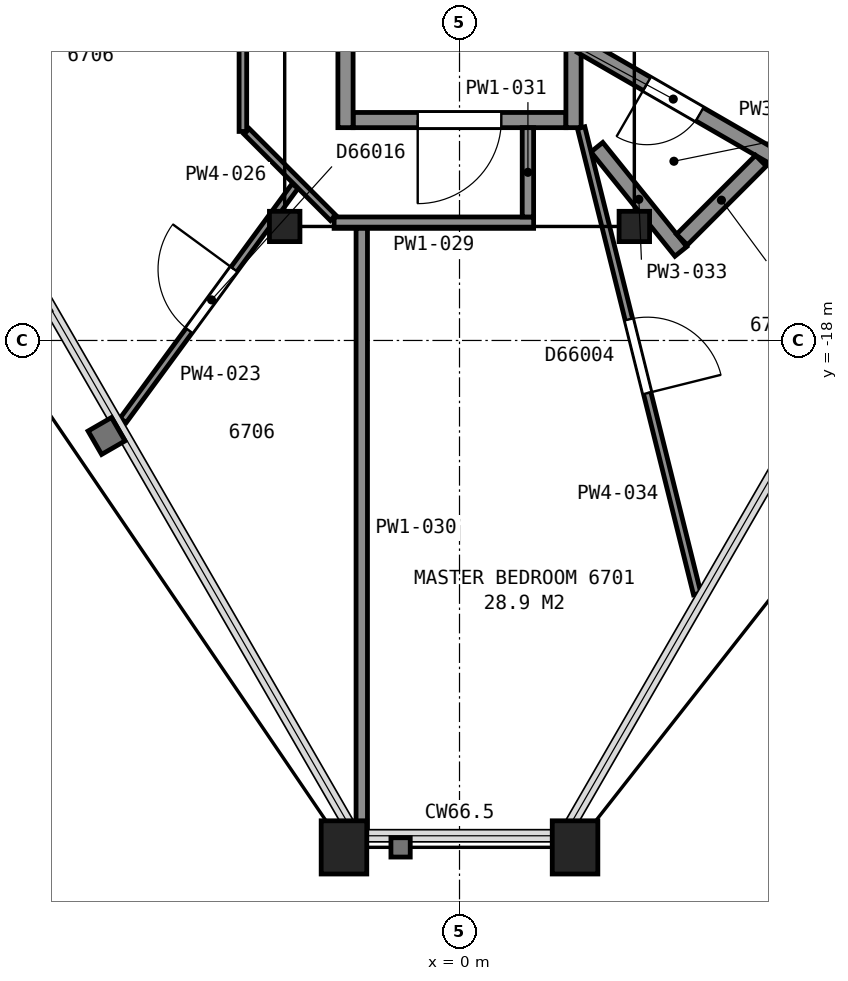
"""IFC4 building model, lengths in metres.
Left out: names, types, materials, properties, quantities, classifications, styles, units other than length and angle.
Written with IfcOpenShell. Run it as: python <this file> out.ifc"""

import sys

from ifc_helpers import new_model, si_unit, direction, frame, frame_2d, origin, origin_2d, place, context, subcontext, project, spatial, rectangle, hollow_rectangle, i_section, extrude, element, fill, save


model = new_model("IFC4")
c1 = context("Model", 3, precision=1e-05, world=origin(), true_north=direction((0.0, 1.0)))
c2 = subcontext(c1, "Body", "Model", "MODEL_VIEW")
j1 = project(units=[si_unit("LENGTHUNIT", "METRE"), si_unit("PLANEANGLEUNIT", "RADIAN")], contexts=[c1])
p1 = place(None, origin())
s1 = spatial("IfcSite", under=j1, at=p1, CompositionType="ELEMENT")
p2 = place(p1, origin())
s2 = spatial("IfcBuilding", under=s1, at=p2, CompositionType="ELEMENT")
p3 = place(p2, frame((0.0, 0.0, 267.7)))
s3 = spatial("IfcBuildingStorey", under=s2, at=p3, CompositionType="ELEMENT", Elevation=267.7)
for number, where, z_axis, x_axis in (
    (1, (-1.52, -24.67, 0.0), (0.0, 0.0, 1.0), (-1.0, 0.0, 0.0)),
    (2, (1.52, -24.67, 0.0), (0.0, 0.0, 1.0), (-1.0, 0.0, 0.0)),
):
    element("IfcColumn", number, at=place(p3, frame(where, z_axis=z_axis, x_axis=x_axis)), inside=s3, PredefinedType="COLUMN", context=c2, shape_type="SweptSolid", body=[
        extrude(hollow_rectangle(XDim=0.6, YDim=0.7, WallThickness=0.04, at=origin_2d()), origin(), (0.0, 0.0, 1.0), 3.7),
    ])
for number, where, z_axis, x_axis in (
    (3, (-2.3, -16.5, 0.0), (0.0, 0.0, 1.0), (-1.0, 0.0, 0.0)),
    (4, (2.3, -16.5, 0.0), (0.0, 0.0, 1.0), (-1.0, 0.0, 0.0)),
):
    element("IfcColumn", number, at=place(p3, frame(where, z_axis=z_axis, x_axis=x_axis)), inside=s3, PredefinedType="COLUMN", context=c2, shape_type="SweptSolid", body=[
        extrude(i_section(OverallWidth=0.401, OverallDepth=0.399, WebThickness=0.025, FlangeThickness=0.04, FilletRadius=0.015, at=origin_2d()), origin(), (0.0, 0.0, 1.0), 3.7),
    ])
p4 = place(p3, frame((-1.4, -15.1, 0.0), z_axis=(0.0, 0.0, 1.0), x_axis=(1.0, 0.0, 0.0)))
e5 = element("IfcWall", 5, at=p4, inside=s3, PredefinedType="PARTITIONING", context=c2, shape_type="SweptSolid", body=[
    extrude(rectangle(XDim=2.8, YDim=0.2, at=frame_2d((1.4, 0.0))), origin(), (0.0, 0.0, 1.0), 3.45),
])
p5 = place(p4, frame((0.85, 0.0, 0.0)))
e6 = element("IfcOpeningElement", 6, at=p5, cuts=e5, PredefinedType="OPENING", context=c2, shape_type="SweptSolid", body=[
    extrude(rectangle(XDim=1.1, YDim=2.1, at=frame_2d((0.55, 1.05))), frame((0.0, 0.11, 0.0), z_axis=(0.0, -1.0, 0.0), x_axis=(1.0, 0.0, 0.0)), (0.0, 0.0, 1.0), 0.22),
])
for number, where, z_axis, x_axis in (
    (7, (1.5, -8.0, 0.0), (0.0, 0.0, 1.0), (0.0, -1.0, 0.0)),
    (8, (-1.5, -8.0, 0.0), (0.0, 0.0, 1.0), (0.0, -1.0, 0.0)),
):
    element("IfcWall", number, at=place(p3, frame(where, z_axis=z_axis, x_axis=x_axis)), inside=s3, PredefinedType="PARTITIONING", context=c2, shape_type="SweptSolid", body=[
        extrude(rectangle(XDim=7.2, YDim=0.2, at=frame_2d((3.6, 0.0))), origin(), (0.0, 0.0, 1.0), 3.45),
    ])
p6 = place(p3, frame((-2.164, -15.968, 0.0), z_axis=(0.0, 0.0, 1.0), x_axis=(-0.591435630084, -0.806352215516, 0.0)))
e9 = element("IfcWall", 9, at=p6, inside=s3, PredefinedType="PARTITIONING", context=c2, shape_type="SweptSolid", body=[
    extrude(rectangle(XDim=3.824, YDim=0.1, at=frame_2d((1.912, 0.0))), origin(), (0.0, 0.0, 1.0), 2.723),
])
p7 = place(p6, frame((1.358, 0.0, 0.0)))
e10 = element("IfcOpeningElement", 10, at=p7, cuts=e9, PredefinedType="OPENING", context=c2, shape_type="SweptSolid", body=[
    extrude(rectangle(XDim=1.0, YDim=2.1, at=frame_2d((0.5, 1.05))), frame((0.0, 0.06, 0.0), z_axis=(0.0, -1.0, 0.0), x_axis=(1.0, 0.0, 0.0)), (0.0, 0.0, 1.0), 0.12),
])
p8 = place(p3, frame((-2.85, -15.25, 0.0), z_axis=(0.0, 0.0, 1.0), x_axis=(0.0, 1.0, 0.0)))
e11 = element("IfcWall", 11, at=p8, inside=s3, PredefinedType="PARTITIONING", context=c2, shape_type="SweptSolid", body=[
    extrude(rectangle(XDim=2.961, YDim=0.1, at=frame_2d((1.48, 0.0))), origin(), (0.0, 0.0, 1.0), 2.723),
])
p9 = place(p3, frame((-2.801, -15.25, 0.0), z_axis=(0.0, 0.0, 1.0), x_axis=(0.707106781187, -0.707106781187, 0.0)))
e12 = element("IfcWall", 12, at=p9, inside=s3, PredefinedType="PARTITIONING", context=c2, shape_type="SweptSolid", body=[
    extrude(rectangle(XDim=1.608, YDim=0.1, at=frame_2d((0.804, 0.0))), origin(), (0.0, 0.0, 1.0), 2.723),
])
p10 = place(p3, frame((-1.65, -16.45, 0.0), z_axis=(0.0, 0.0, 1.0), x_axis=(1.0, 0.0, 0.0)))
e13 = element("IfcWall", 13, at=p10, inside=s3, PredefinedType="PARTITIONING", context=c2, shape_type="SweptSolid", body=[
    extrude(rectangle(XDim=2.625, YDim=0.15, at=frame_2d((1.312, 0.0))), origin(), (0.0, 0.0, 1.0), 2.723),
])
p11 = place(p3, frame((-1.286, -24.421, 0.0), z_axis=(0.0, 0.0, 1.0), x_axis=(0.0, 1.0, 0.0)))
e14 = element("IfcWall", 14, at=p11, inside=s3, PredefinedType="PARTITIONING", context=c2, shape_type="SweptSolid", body=[
    extrude(rectangle(XDim=7.896, YDim=0.15, at=frame_2d((3.948, 0.0))), origin(), (0.0, 0.0, 1.0), 2.723),
])
p12 = place(p3, frame((0.9, -16.375, 0.0), z_axis=(0.0, 0.0, 1.0), x_axis=(0.0, 1.0, 0.0)))
e15 = element("IfcWall", 15, at=p12, inside=s3, PredefinedType="PARTITIONING", context=c2, shape_type="SweptSolid", body=[
    extrude(rectangle(XDim=1.175, YDim=0.15, at=frame_2d((0.587, 0.0))), origin(), (0.0, 0.0, 1.0), 2.723),
])
p13 = place(p3, frame((1.807, -15.457, 0.0), z_axis=(0.0, 0.0, 1.0), x_axis=(0.62721044395, -0.778849830841, 0.0)))
e16 = element("IfcWall", 16, at=p13, inside=s3, PredefinedType="PARTITIONING", context=c2, shape_type="SweptSolid", body=[
    extrude(rectangle(XDim=1.761, YDim=0.2, at=frame_2d((0.881, 0.0))), origin(), (0.0, 0.0, 1.0), 2.723),
])
p14 = place(p3, frame((3.127, -21.335, 0.0), z_axis=(0.0, 0.0, 1.0), x_axis=(-0.241554155251, 0.970387340231, 0.0)))
e17 = element("IfcWall", 17, at=p14, inside=s3, PredefinedType="PARTITIONING", context=c2, shape_type="SweptSolid", body=[
    extrude(rectangle(XDim=6.322, YDim=0.1, at=frame_2d((3.161, 0.0))), origin(), (0.0, 0.0, 1.0), 2.723),
])
p15 = place(p14, frame((2.722, 0.0, 0.0)))
e18 = element("IfcOpeningElement", 18, at=p15, cuts=e17, PredefinedType="OPENING", context=c2, shape_type="SweptSolid", body=[
    extrude(rectangle(XDim=1.0, YDim=2.1, at=frame_2d((0.5, 1.05))), frame((0.0, 0.06, 0.0), z_axis=(0.0, -1.0, 0.0), x_axis=(1.0, 0.0, 0.0)), (0.0, 0.0, 1.0), 0.12),
])
p16 = place(p3, frame((4.144, -15.593, 0.0), z_axis=(0.0, 0.0, 1.0), x_axis=(-0.865947474014, 0.500134954036, 0.0)))
e19 = element("IfcWall", 19, at=p16, inside=s3, PredefinedType="PARTITIONING", context=c2, shape_type="SweptSolid", body=[
    extrude(rectangle(XDim=2.937, YDim=0.2, at=frame_2d((1.469, 0.0))), origin(), (0.0, 0.0, 1.0), 2.723),
])
p17 = place(p16, frame((1.137, 0.0, 0.0)))
e20 = element("IfcOpeningElement", 20, at=p17, cuts=e19, PredefinedType="OPENING", context=c2, shape_type="SweptSolid", body=[
    extrude(rectangle(XDim=0.8, YDim=2.1, at=frame_2d((0.4, 1.05))), frame((0.0, 0.11, 0.0), z_axis=(0.0, -1.0, 0.0), x_axis=(1.0, 0.0, 0.0)), (0.0, 0.0, 1.0), 0.22),
])
p18 = place(p3, frame((2.927, -16.673, 0.0), z_axis=(0.0, 0.0, 1.0), x_axis=(0.707106781187, 0.707106781187, 0.0)))
e21 = element("IfcWall", 21, at=p18, inside=s3, PredefinedType="PARTITIONING", context=c2, shape_type="SweptSolid", body=[
    extrude(rectangle(XDim=1.469, YDim=0.2, at=frame_2d((0.734, 0.0))), origin(), (0.0, 0.0, 1.0), 2.723),
])
p19 = place(p5, origin())
e22 = element("IfcDoor", 22, at=p19, inside=s3, OperationType="SINGLE_SWING_LEFT", PredefinedType="DOOR", context=c2, shape_type="SweptSolid", body=[
    extrude(rectangle(XDim=1.1, YDim=2.1, at=frame_2d((0.55, 1.05))), frame((0.0, 0.025, 0.0), z_axis=(0.0, -1.0, 0.0), x_axis=(1.0, 0.0, 0.0)), (0.0, 0.0, 1.0), 0.05),
])
fill(e6, e22)
p20 = place(p7, origin())
e23 = element("IfcDoor", 23, at=p20, inside=s3, OperationType="SINGLE_SWING_LEFT", PredefinedType="DOOR", context=c2, shape_type="SweptSolid", body=[
    extrude(rectangle(XDim=1.0, YDim=2.1, at=frame_2d((0.5, 1.05))), frame((0.0, 0.025, 0.0), z_axis=(0.0, -1.0, 0.0), x_axis=(1.0, 0.0, 0.0)), (0.0, 0.0, 1.0), 0.05),
])
fill(e10, e23)
p21 = place(p15, origin())
e24 = element("IfcDoor", 24, at=p21, inside=s3, OperationType="SINGLE_SWING_LEFT", PredefinedType="DOOR", context=c2, shape_type="SweptSolid", body=[
    extrude(rectangle(XDim=1.0, YDim=2.1, at=frame_2d((0.5, 1.05))), frame((0.0, 0.025, 0.0), z_axis=(0.0, -1.0, 0.0), x_axis=(1.0, 0.0, 0.0)), (0.0, 0.0, 1.0), 0.05),
])
fill(e18, e24)
p22 = place(p17, origin())
e25 = element("IfcDoor", 25, at=p22, inside=s3, OperationType="SINGLE_SWING_RIGHT", PredefinedType="DOOR", context=c2, shape_type="SweptSolid", body=[
    extrude(rectangle(XDim=0.8, YDim=2.1, at=frame_2d((0.4, 1.05))), frame((0.0, 0.025, 0.0), z_axis=(0.0, -1.0, 0.0), x_axis=(1.0, 0.0, 0.0)), (0.0, 0.0, 1.0), 0.05),
])
fill(e20, e25)
save(model, sys.argv[1])
